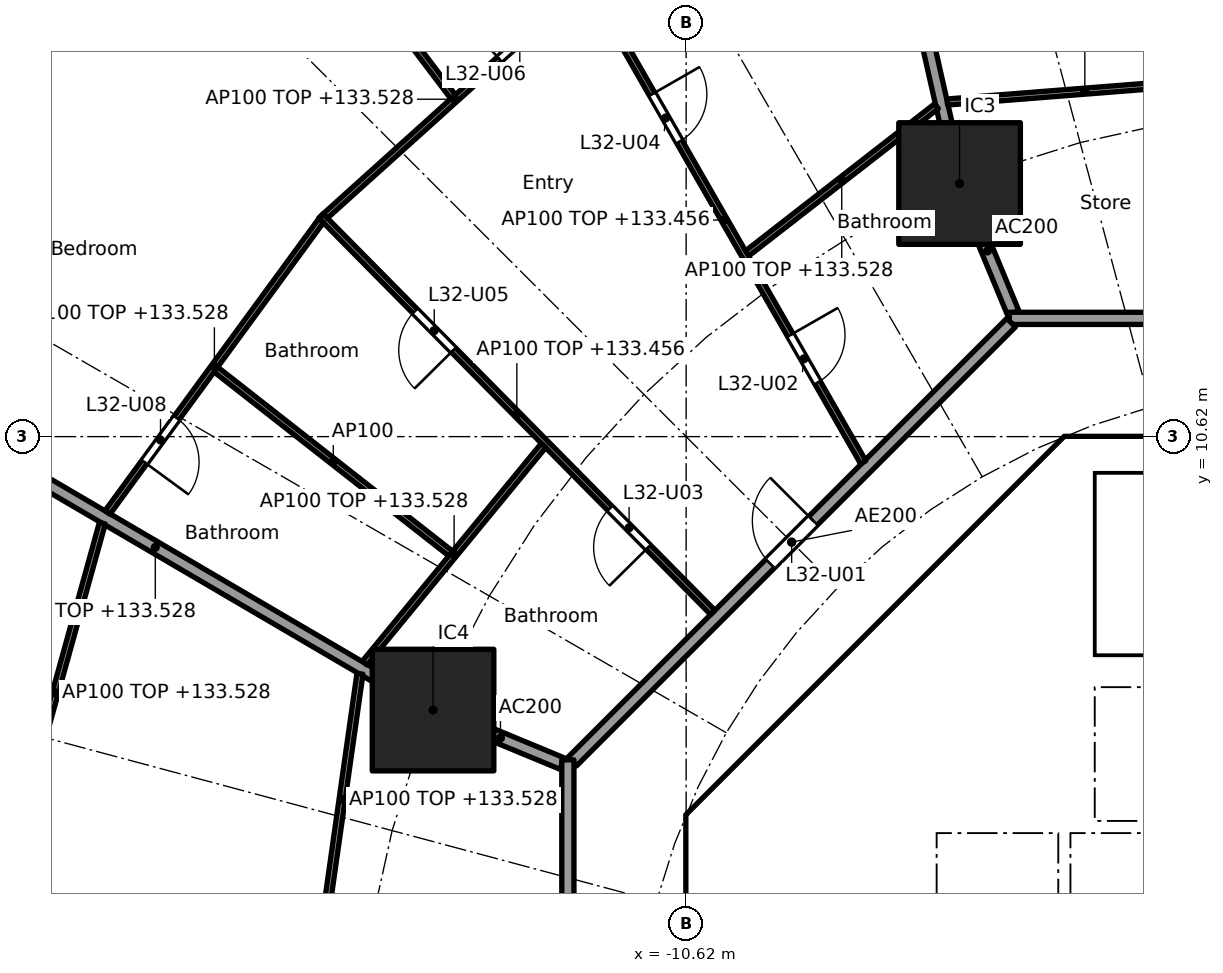
"""IFC4 building model, lengths in metres.
Left out: names, types, materials, properties, quantities, classifications, styles, units other than length and angle.
Written with IfcOpenShell. Run it as: python <this file> out.ifc"""

import sys

from ifc_helpers import new_model, si_unit, direction, frame, frame_2d, origin, origin_2d, place, context, subcontext, project, spatial, polyline, rectangle, outline, extrude, element, fill, save


model = new_model("IFC4")
c1 = context("Model", 3, precision=1e-05, world=origin(), true_north=direction((0.0, 1.0)))
c2 = subcontext(c1, "Body", "Model", "MODEL_VIEW")
j1 = project(units=[si_unit("LENGTHUNIT", "METRE"), si_unit("PLANEANGLEUNIT", "RADIAN")], contexts=[c1])
p1 = place(None, origin())
s1 = spatial("IfcSite", under=j1, at=p1, CompositionType="ELEMENT")
p2 = place(p1, origin())
s2 = spatial("IfcBuilding", under=s1, at=p2, CompositionType="ELEMENT")
p3 = place(p2, frame((0.0, 0.0, 130.7)))
s3 = spatial("IfcBuildingStorey", under=s2, at=p3, CompositionType="ELEMENT", Elevation=130.7)
for number, where, z_axis, x_axis in (
    (1, (-6.123, 14.782, 0.0), (0.0, 0.0, 1.0), (1.0, 0.0, 0.0)),
    (2, (-14.782, 6.123, 0.0), (0.0, 0.0, 1.0), (1.0, 0.0, 0.0)),
):
    element("IfcColumn", number, at=place(p3, frame(where, z_axis=z_axis, x_axis=x_axis)), inside=s3, PredefinedType="COLUMN", context=c2, shape_type="SweptSolid", body=[
        extrude(rectangle(XDim=2.0, YDim=2.0, at=origin_2d()), origin(), (0.0, 0.0, 1.0), 3.7),
    ])
p4 = place(p3, frame((-4.613, 9.988, 0.0), z_axis=(0.0, 0.0, 1.0), x_axis=(-0.707106781187, -0.707106781187, 0.0)))
e3 = element("IfcWall", 3, at=p4, inside=s3, PredefinedType="SHEAR", context=c2, shape_type="SweptSolid", body=[
    extrude(rectangle(XDim=7.602, YDim=0.6, at=frame_2d((3.801, 0.0))), origin(), (0.0, 0.0, 1.0), 3.44),
])
p5 = place(p4, frame((0.351, 0.0, 0.0)))
e4 = element("IfcOpeningElement", 4, at=p5, cuts=e3, PredefinedType="OPENING", context=c2, shape_type="SweptSolid", body=[
    extrude(rectangle(XDim=1.1, YDim=2.1, at=frame_2d((0.55, 1.05))), frame((0.0, 0.31, 0.0), z_axis=(0.0, -1.0, 0.0), x_axis=(1.0, 0.0, 0.0)), (0.0, 0.0, 1.0), 0.62),
])
p6 = place(p3, frame((-10.325, 3.801, 0.0), z_axis=(0.0, 0.0, 1.0), x_axis=(0.0, -1.0, 0.0)))
e5 = element("IfcWall", 5, at=p6, inside=s3, PredefinedType="SHEAR", context=c2, shape_type="SweptSolid", body=[
    extrude(rectangle(XDim=7.602, YDim=0.6, at=frame_2d((3.801, 0.0))), origin(), (0.0, 0.0, 1.0), 3.44),
])
p7 = place(p6, frame((0.651, 0.0, 0.0)))
e6 = element("IfcOpeningElement", 6, at=p7, cuts=e5, PredefinedType="OPENING", context=c2, shape_type="SweptSolid", body=[
    extrude(rectangle(XDim=1.5, YDim=2.1, at=frame_2d((0.75, 1.05))), frame((0.0, 0.31, 0.0), z_axis=(0.0, -1.0, 0.0), x_axis=(1.0, 0.0, 0.0)), (0.0, 0.0, 1.0), 0.62),
])
p8 = place(p6, frame((5.451, 0.0, 0.0)))
e7 = element("IfcOpeningElement", 7, at=p8, cuts=e5, PredefinedType="OPENING", context=c2, shape_type="SweptSolid", body=[
    extrude(rectangle(XDim=1.5, YDim=2.1, at=frame_2d((0.75, 1.05))), frame((0.0, 0.31, 0.0), z_axis=(0.0, -1.0, 0.0), x_axis=(1.0, 0.0, 0.0)), (0.0, 0.0, 1.0), 0.62),
])
p9 = place(p3, frame((-6.2, 4.3, 0.0), z_axis=(0.0, 0.0, 1.0), x_axis=(0.0, 1.0, 0.0)))
e8 = element("IfcWall", 8, at=p9, inside=s3, PredefinedType="PARTITIONING", context=c2, shape_type="SweptSolid", body=[
    extrude(rectangle(XDim=3.527, YDim=0.15, at=frame_2d((1.763, 0.0))), origin(), (0.0, 0.0, 1.0), 3.44),
])
p10 = place(p9, frame((0.262, 0.0, 0.0)))
e9 = element("IfcOpeningElement", 9, at=p10, cuts=e8, PredefinedType="OPENING", context=c2, shape_type="SweptSolid", body=[
    extrude(rectangle(XDim=0.9, YDim=2.1, at=frame_2d((0.45, 1.05))), frame((0.0, 0.085, 0.0), z_axis=(0.0, -1.0, 0.0), x_axis=(1.0, 0.0, 0.0)), (0.0, 0.0, 1.0), 0.17),
])
p11 = place(p9, frame((2.138, 0.0, 0.0)))
e10 = element("IfcOpeningElement", 10, at=p11, cuts=e8, PredefinedType="OPENING", context=c2, shape_type="SweptSolid", body=[
    extrude(rectangle(XDim=0.9, YDim=2.1, at=frame_2d((0.45, 1.05))), frame((0.0, 0.085, 0.0), z_axis=(0.0, -1.0, 0.0), x_axis=(1.0, 0.0, 0.0)), (0.0, 0.0, 1.0), 0.17),
])
p12 = place(p3, frame((-4.0, 4.3, 0.0), z_axis=(0.0, 0.0, 1.0), x_axis=(0.0, 1.0, 0.0)))
e11 = element("IfcWall", 11, at=p12, inside=s3, PredefinedType="SOLIDWALL", context=c2, shape_type="SweptSolid", body=[
    extrude(rectangle(XDim=2.2, YDim=0.2, at=frame_2d((1.1, 0.0))), origin(), (0.0, 0.0, 1.0), 3.44),
])
p13 = place(p12, frame((0.55, 0.0, 0.0)))
e12 = element("IfcOpeningElement", 12, at=p13, cuts=e11, PredefinedType="OPENING", context=c2, shape_type="SweptSolid", body=[
    extrude(rectangle(XDim=1.1, YDim=2.1, at=frame_2d((0.55, 1.05))), frame((0.0, 0.11, 0.0), z_axis=(0.0, -1.0, 0.0), x_axis=(1.0, 0.0, 0.0)), (0.0, 0.0, 1.0), 0.22),
])
p14 = place(p3, origin())
e13 = element("IfcWall", 13, at=p14, inside=s3, PredefinedType="SHEAR", context=c2, shape_type="SweptSolid", body=[
    extrude(outline(polyline([(-10.2, 4.825), (-9.776, 4.401), (-10.025, 4.152), (-10.025, 3.801), (-10.625, 3.801), (-10.625, 4.401), (-10.2, 4.825)])), origin(), (0.0, 0.0, 1.0), 3.44),
])
p15 = place(p3, origin())
e14 = element("IfcWall", 14, at=p15, inside=s3, PredefinedType="SHEAR", context=c2, shape_type="SweptSolid", body=[
    extrude(outline(polyline([(-4.152, 10.025), (-4.401, 9.776), (-4.825, 10.2), (-4.401, 10.625), (4.401, 10.625), (4.825, 10.2), (4.401, 9.776), (4.152, 10.025), (-4.152, 10.025)])), origin(), (0.0, 0.0, 1.0), 3.44),
])
p16 = place(p3, frame((-10.025, 4.0, 0.0), z_axis=(0.0, 0.0, 1.0), x_axis=(1.0, 0.0, 0.0)))
e15 = element("IfcWall", 15, at=p16, inside=s3, PredefinedType="PARTITIONING", context=c2, shape_type="SweptSolid", body=[
    extrude(rectangle(XDim=3.325, YDim=0.2, at=frame_2d((1.662, 0.0))), origin(), (0.0, 0.0, 1.0), 3.44),
])
p17 = place(p3, frame((-8.301, 5.8, 0.0), z_axis=(0.0, 0.0, 1.0), x_axis=(1.0, 0.0, 0.0)))
e16 = element("IfcWall", 16, at=p17, inside=s3, PredefinedType="PARTITIONING", context=c2, shape_type="SweptSolid", body=[
    extrude(rectangle(XDim=2.026, YDim=0.15, at=frame_2d((1.013, 0.0))), origin(), (0.0, 0.0, 1.0), 3.44),
])
p18 = place(p3, origin())
e17 = element("IfcWall", 17, at=p18, inside=s3, PredefinedType="SOLIDWALL", context=c2, shape_type="SweptSolid", body=[
    extrude(outline(polyline([(-6.5, 2.1), (-6.7, 2.1), (-6.7, 4.3), (6.7, 4.3), (6.7, 2.1), (6.5, 2.1), (6.5, 4.1), (4.5, 4.1), (4.5, 2.1), (4.3, 2.1), (4.3, 4.1), (2.3, 4.1), (2.3, 2.1), (2.1, 2.1), (2.1, 4.1), (0.1, 4.1), (0.1, 2.1), (-0.1, 2.1), (-0.1, 4.1), (-2.1, 4.1), (-2.1, 2.1), (-2.3, 2.1), (-2.3, 4.1), (-4.3, 4.1), (-4.3, 2.1), (-4.5, 2.1), (-4.5, 4.1), (-6.5, 4.1), (-6.5, 2.1)])), origin(), (0.0, 0.0, 1.0), 3.44),
])
p19 = place(p3, origin())
e18 = element("IfcWall", 18, at=p19, inside=s3, PredefinedType="SOLIDWALL", context=c2, shape_type="SweptSolid", body=[
    extrude(outline(polyline([(-3.9, 7.025), (-4.1, 7.025), (-4.1, 10.025), (-3.9, 10.025), (-3.9, 7.025)])), origin(), (0.0, 0.0, 1.0), 3.44),
])
p20 = place(p3, origin())
e19 = element("IfcWall", 19, at=p20, inside=s3, PredefinedType="SOLIDWALL", context=c2, shape_type="SweptSolid", body=[
    extrude(outline(polyline([(4.1, 6.5), (-4.1, 6.5), (-4.1, 7.025), (4.1, 7.025), (4.1, 6.5)])), origin(), (0.0, 0.0, 1.0), 3.44),
])
p21 = place(p3, frame((-5.243, 12.657, 0.0), z_axis=(0.0, 0.0, 1.0), x_axis=(-0.38273085373, 0.923859888513, 0.0)))
e20 = element("IfcWall", 20, at=p21, inside=s3, PredefinedType="PARTITIONING", context=c2, shape_type="SweptSolid", body=[
    extrude(rectangle(XDim=2.199, YDim=0.2, at=frame_2d((1.1, 0.0))), origin(), (0.0, 0.0, 1.0), 3.44),
])
p22 = place(p3, frame((-6.134, 14.831, 0.0), z_axis=(0.0, 0.0, 1.0), x_axis=(-0.220337590808, 0.975423675167, 0.0)))
e21 = element("IfcWall", 21, at=p22, inside=s3, PredefinedType="PARTITIONING", context=c2, shape_type="SweptSolid", body=[
    extrude(rectangle(XDim=10.451, YDim=0.2, at=frame_2d((5.226, 0.0))), origin(), (0.0, 0.0, 1.0), 2.828),
])
p23 = place(p3, frame((-12.657, 5.243, 0.0), z_axis=(0.0, 0.0, 1.0), x_axis=(-0.923869415315, 0.382707856524, 0.0)))
e22 = element("IfcWall", 22, at=p23, inside=s3, PredefinedType="PARTITIONING", context=c2, shape_type="SweptSolid", body=[
    extrude(rectangle(XDim=2.2, YDim=0.2, at=frame_2d((1.1, 0.0))), origin(), (0.0, 0.0, 1.0), 3.44),
])
p24 = place(p3, frame((-14.825, 6.148, 0.0), z_axis=(0.0, 0.0, 1.0), x_axis=(-0.862852031662, 0.505456597006, 0.0)))
e23 = element("IfcWall", 23, at=p24, inside=s3, PredefinedType="PARTITIONING", context=c2, shape_type="SweptSolid", body=[
    extrude(rectangle(XDim=10.487, YDim=0.2, at=frame_2d((5.244, 0.0))), origin(), (0.0, 0.0, 1.0), 2.828),
])
p25 = place(p3, frame((5.104, 12.565, 0.0), z_axis=(0.0, 0.0, 1.0), x_axis=(-1.0, 0.0, 0.0)))
e24 = element("IfcWall", 24, at=p25, inside=s3, PredefinedType="PARTITIONING", context=c2, shape_type="SweptSolid", body=[
    extrude(rectangle(XDim=10.409, YDim=0.2, at=frame_2d((5.205, 0.0))), origin(), (0.0, 0.0, 1.0), 3.44),
])
p26 = place(p25, frame((4.604, 0.0, 0.0)))
e25 = element("IfcOpeningElement", 25, at=p26, cuts=e24, PredefinedType="OPENING", context=c2, shape_type="SweptSolid", body=[
    extrude(rectangle(XDim=1.0, YDim=2.1, at=frame_2d((0.5, 1.05))), frame((0.0, 0.11, 0.0), z_axis=(0.0, -1.0, 0.0), x_axis=(1.0, 0.0, 0.0)), (0.0, 0.0, 1.0), 0.22),
])
p27 = place(p3, frame((-5.275, 12.494, 0.0), z_axis=(0.0, 0.0, 1.0), x_axis=(-0.707106781187, -0.707106781187, 0.0)))
e26 = element("IfcWall", 26, at=p27, inside=s3, PredefinedType="PARTITIONING", context=c2, shape_type="SweptSolid", body=[
    extrude(rectangle(XDim=10.209, YDim=0.2, at=frame_2d((5.104, 0.0))), origin(), (0.0, 0.0, 1.0), 3.44),
])
p28 = place(p27, frame((4.604, 0.0, 0.0)))
e27 = element("IfcOpeningElement", 27, at=p28, cuts=e26, PredefinedType="OPENING", context=c2, shape_type="SweptSolid", body=[
    extrude(rectangle(XDim=1.0, YDim=2.1, at=frame_2d((0.5, 1.05))), frame((0.0, 0.11, 0.0), z_axis=(0.0, -1.0, 0.0), x_axis=(1.0, 0.0, 0.0)), (0.0, 0.0, 1.0), 0.22),
])
p29 = place(p3, frame((-12.565, 5.304, 0.0), z_axis=(0.0, 0.0, 1.0), x_axis=(0.0, -1.0, 0.0)))
e28 = element("IfcWall", 28, at=p29, inside=s3, PredefinedType="PARTITIONING", context=c2, shape_type="SweptSolid", body=[
    extrude(rectangle(XDim=10.409, YDim=0.2, at=frame_2d((5.205, 0.0))), origin(), (0.0, 0.0, 1.0), 3.44),
])
p30 = place(p3, frame((-1.802, 16.479, 0.0), z_axis=(0.0, 0.0, 1.0), x_axis=(-0.996907698294, -0.078581429625, 0.0)))
e29 = element("IfcWall", 29, at=p30, inside=s3, PredefinedType="PARTITIONING", context=c2, shape_type="SweptSolid", body=[
    extrude(rectangle(XDim=4.536, YDim=0.1, at=frame_2d((2.268, 0.0))), origin(), (0.0, 0.0, 1.0), 2.828),
])
p31 = place(p3, frame((-6.503, 16.054, 0.0), z_axis=(0.0, 0.0, 1.0), x_axis=(-0.789428807693, -0.613842127574, 0.0)))
e30 = element("IfcWall", 30, at=p31, inside=s3, PredefinedType="PARTITIONING", context=c2, shape_type="SweptSolid", body=[
    extrude(rectangle(XDim=3.948, YDim=0.1, at=frame_2d((1.974, 0.0))), origin(), (0.0, 0.0, 1.0), 2.828),
])
p32 = place(p3, frame((-7.708, 10.198, 0.0), z_axis=(0.0, 0.0, 1.0), x_axis=(-0.497449462689, 0.867492957937, 0.0)))
e31 = element("IfcWall", 31, at=p32, inside=s3, PredefinedType="PARTITIONING", context=c2, shape_type="SweptSolid", body=[
    extrude(rectangle(XDim=9.185, YDim=0.1, at=frame_2d((4.592, 0.0))), origin(), (0.0, 0.0, 1.0), 2.756),
])
p33 = place(p32, frame((1.511, 0.0, 0.0)))
e32 = element("IfcOpeningElement", 32, at=p33, cuts=e31, PredefinedType="OPENING", context=c2, shape_type="SweptSolid", body=[
    extrude(rectangle(XDim=0.9, YDim=2.1, at=frame_2d((0.45, 1.05))), frame((0.0, 0.06, 0.0), z_axis=(0.0, -1.0, 0.0), x_axis=(1.0, 0.0, 0.0)), (0.0, 0.0, 1.0), 0.12),
])
p34 = place(p32, frame((6.078, 0.0, 0.0)))
e33 = element("IfcOpeningElement", 33, at=p34, cuts=e31, PredefinedType="OPENING", context=c2, shape_type="SweptSolid", body=[
    extrude(rectangle(XDim=0.9, YDim=2.1, at=frame_2d((0.45, 1.05))), frame((0.0, 0.06, 0.0), z_axis=(0.0, -1.0, 0.0), x_axis=(1.0, 0.0, 0.0)), (0.0, 0.0, 1.0), 0.12),
])
p35 = place(p3, frame((-12.289, 18.089, 0.0), z_axis=(0.0, 0.0, 1.0), x_axis=(-0.743146066164, -0.669129228435, 0.0)))
e34 = element("IfcWall", 34, at=p35, inside=s3, PredefinedType="PARTITIONING", context=c2, shape_type="SweptSolid", body=[
    extrude(rectangle(XDim=5.739, YDim=0.1, at=frame_2d((2.87, 0.0))), origin(), (0.0, 0.0, 1.0), 2.828),
])
p36 = place(p35, frame((0.985, 0.0, 0.0)))
e35 = element("IfcOpeningElement", 35, at=p36, cuts=e34, PredefinedType="OPENING", context=c2, shape_type="SweptSolid", body=[
    extrude(rectangle(XDim=0.9, YDim=2.1, at=frame_2d((0.45, 1.05))), frame((0.0, 0.06, 0.0), z_axis=(0.0, -1.0, 0.0), x_axis=(1.0, 0.0, 0.0)), (0.0, 0.0, 1.0), 0.12),
])
p37 = place(p3, frame((-14.452, 16.208, 0.0), z_axis=(0.0, 0.0, 1.0), x_axis=(-0.603267974074, 0.797538557975, 0.0)))
e36 = element("IfcWall", 36, at=p37, inside=s3, PredefinedType="PARTITIONING", context=c2, shape_type="SweptSolid", body=[
    extrude(rectangle(XDim=5.764, YDim=0.1, at=frame_2d((2.882, 0.0))), origin(), (0.0, 0.0, 1.0), 2.905),
])
p38 = place(p37, frame((2.432, 0.0, 0.0)))
e37 = element("IfcOpeningElement", 37, at=p38, cuts=e36, PredefinedType="OPENING", context=c2, shape_type="SweptSolid", body=[
    extrude(rectangle(XDim=0.9, YDim=2.1, at=frame_2d((0.45, 1.05))), frame((0.0, 0.06, 0.0), z_axis=(0.0, -1.0, 0.0), x_axis=(1.0, 0.0, 0.0)), (0.0, 0.0, 1.0), 0.12),
])
p39 = place(p3, frame((-10.182, 7.729, 0.0), z_axis=(0.0, 0.0, 1.0), x_axis=(-0.702927211734, 0.711261790766, 0.0)))
e38 = element("IfcWall", 38, at=p39, inside=s3, PredefinedType="PARTITIONING", context=c2, shape_type="SweptSolid", body=[
    extrude(rectangle(XDim=9.168, YDim=0.1, at=frame_2d((4.584, 0.0))), origin(), (0.0, 0.0, 1.0), 2.756),
])
p40 = place(p39, frame((1.507, 0.0, 0.0)))
e39 = element("IfcOpeningElement", 39, at=p40, cuts=e38, PredefinedType="OPENING", context=c2, shape_type="SweptSolid", body=[
    extrude(rectangle(XDim=0.9, YDim=2.1, at=frame_2d((0.45, 1.05))), frame((0.0, 0.06, 0.0), z_axis=(0.0, -1.0, 0.0), x_axis=(1.0, 0.0, 0.0)), (0.0, 0.0, 1.0), 0.12),
])
p41 = place(p39, frame((6.067, 0.0, 0.0)))
e40 = element("IfcOpeningElement", 40, at=p41, cuts=e38, PredefinedType="OPENING", context=c2, shape_type="SweptSolid", body=[
    extrude(rectangle(XDim=0.9, YDim=2.1, at=frame_2d((0.45, 1.05))), frame((0.0, 0.06, 0.0), z_axis=(0.0, -1.0, 0.0), x_axis=(1.0, 0.0, 0.0)), (0.0, 0.0, 1.0), 0.12),
])
p42 = place(p3, frame((-12.965, 10.475, 0.0), z_axis=(0.0, 0.0, 1.0), x_axis=(-0.634943961338, -0.772558195841, 0.0)))
e41 = element("IfcWall", 41, at=p42, inside=s3, PredefinedType="PARTITIONING", context=c2, shape_type="SweptSolid", body=[
    extrude(rectangle(XDim=4.632, YDim=0.1, at=frame_2d((2.316, 0.0))), origin(), (0.0, 0.0, 1.0), 2.828),
])
p43 = place(p3, frame((-16.621, 14.174, 0.0), z_axis=(0.0, 0.0, 1.0), x_axis=(-0.590674917338, -0.806909624449, 0.0)))
e42 = element("IfcWall", 42, at=p43, inside=s3, PredefinedType="PARTITIONING", context=c2, shape_type="SweptSolid", body=[
    extrude(rectangle(XDim=5.949, YDim=0.1, at=frame_2d((2.975, 0.0))), origin(), (0.0, 0.0, 1.0), 2.828),
])
p44 = place(p43, frame((4.024, 0.0, 0.0)))
e43 = element("IfcOpeningElement", 43, at=p44, cuts=e42, PredefinedType="OPENING", context=c2, shape_type="SweptSolid", body=[
    extrude(rectangle(XDim=0.9, YDim=2.1, at=frame_2d((0.45, 1.05))), frame((0.0, 0.06, 0.0), z_axis=(0.0, -1.0, 0.0), x_axis=(1.0, 0.0, 0.0)), (0.0, 0.0, 1.0), 0.12),
])
p45 = place(p3, frame((-14.491, 8.697, 0.0), z_axis=(0.0, 0.0, 1.0), x_axis=(-0.787139479951, 0.616775031193, 0.0)))
e44 = element("IfcWall", 44, at=p45, inside=s3, PredefinedType="PARTITIONING", context=c2, shape_type="SweptSolid", body=[
    extrude(rectangle(XDim=4.907, YDim=0.1, at=frame_2d((2.453, 0.0))), origin(), (0.0, 0.0, 1.0), 3.44),
])
p46 = place(p3, frame((-15.984, 6.72, 0.0), z_axis=(0.0, 0.0, 1.0), x_axis=(-0.140684869512, -0.990054426529, 0.0)))
e45 = element("IfcWall", 45, at=p46, inside=s3, PredefinedType="PARTITIONING", context=c2, shape_type="SweptSolid", body=[
    extrude(rectangle(XDim=4.177, YDim=0.1, at=frame_2d((2.088, 0.0))), origin(), (0.0, 0.0, 1.0), 2.828),
])
p47 = place(p3, frame((-20.221, 9.197, 0.0), z_axis=(0.0, 0.0, 1.0), x_axis=(-0.267398009191, -0.963586168789, 0.0)))
e46 = element("IfcWall", 46, at=p47, inside=s3, PredefinedType="PARTITIONING", context=c2, shape_type="SweptSolid", body=[
    extrude(rectangle(XDim=5.788, YDim=0.1, at=frame_2d((2.894, 0.0))), origin(), (0.0, 0.0, 1.0), 2.828),
])
p48 = place(p13, origin())
e47 = element("IfcDoor", 47, at=p48, inside=s3, OperationType="DOUBLE_DOOR_SLIDING", PredefinedType="DOOR", context=c2, shape_type="SweptSolid", body=[
    extrude(rectangle(XDim=1.1, YDim=2.1, at=frame_2d((0.55, 1.05))), frame((0.0, 0.025, 0.0), z_axis=(0.0, -1.0, 0.0), x_axis=(1.0, 0.0, 0.0)), (0.0, 0.0, 1.0), 0.05),
])
fill(e12, e47)
p49 = place(p10, origin())
e48 = element("IfcDoor", 48, at=p49, inside=s3, OperationType="SINGLE_SWING_RIGHT", PredefinedType="DOOR", context=c2, shape_type="SweptSolid", body=[
    extrude(rectangle(XDim=0.9, YDim=2.1, at=frame_2d((0.45, 1.05))), frame((0.0, 0.025, 0.0), z_axis=(0.0, -1.0, 0.0), x_axis=(1.0, 0.0, 0.0)), (0.0, 0.0, 1.0), 0.05),
])
fill(e9, e48)
p50 = place(p11, origin())
e49 = element("IfcDoor", 49, at=p50, inside=s3, OperationType="SINGLE_SWING_RIGHT", PredefinedType="DOOR", context=c2, shape_type="SweptSolid", body=[
    extrude(rectangle(XDim=0.9, YDim=2.1, at=frame_2d((0.45, 1.05))), frame((0.0, 0.025, 0.0), z_axis=(0.0, -1.0, 0.0), x_axis=(1.0, 0.0, 0.0)), (0.0, 0.0, 1.0), 0.05),
])
fill(e10, e49)
p51 = place(p7, origin())
e50 = element("IfcDoor", 50, at=p51, inside=s3, OperationType="DOUBLE_DOOR_SINGLE_SWING", PredefinedType="DOOR", context=c2, shape_type="SweptSolid", body=[
    extrude(rectangle(XDim=1.5, YDim=2.1, at=frame_2d((0.75, 1.05))), frame((0.0, 0.025, 0.0), z_axis=(0.0, -1.0, 0.0), x_axis=(1.0, 0.0, 0.0)), (0.0, 0.0, 1.0), 0.05),
])
fill(e6, e50)
p52 = place(p5, origin())
e51 = element("IfcDoor", 51, at=p52, inside=s3, OperationType="SINGLE_SWING_LEFT", PredefinedType="DOOR", context=c2, shape_type="SweptSolid", body=[
    extrude(rectangle(XDim=1.1, YDim=2.1, at=frame_2d((0.55, 1.05))), frame((0.0, 0.025, 0.0), z_axis=(0.0, -1.0, 0.0), x_axis=(1.0, 0.0, 0.0)), (0.0, 0.0, 1.0), 0.05),
])
fill(e4, e51)
p53 = place(p28, frame((1.0, 0.0, 0.0), x_axis=(-1.0, 0.0, 0.0)))
e52 = element("IfcDoor", 52, at=p53, inside=s3, OperationType="SINGLE_SWING_RIGHT", PredefinedType="DOOR", context=c2, shape_type="SweptSolid", body=[
    extrude(rectangle(XDim=1.0, YDim=2.1, at=frame_2d((0.5, 1.05))), frame((0.0, 0.025, 0.0), z_axis=(0.0, -1.0, 0.0), x_axis=(1.0, 0.0, 0.0)), (0.0, 0.0, 1.0), 0.05),
])
fill(e27, e52)
p54 = place(p33, frame((0.9, 0.0, 0.0), x_axis=(-1.0, 0.0, 0.0)))
e53 = element("IfcDoor", 53, at=p54, inside=s3, OperationType="SINGLE_SWING_LEFT", PredefinedType="DOOR", context=c2, shape_type="SweptSolid", body=[
    extrude(rectangle(XDim=0.9, YDim=2.1, at=frame_2d((0.45, 1.05))), frame((0.0, 0.025, 0.0), z_axis=(0.0, -1.0, 0.0), x_axis=(1.0, 0.0, 0.0)), (0.0, 0.0, 1.0), 0.05),
])
fill(e32, e53)
p55 = place(p40, origin())
e54 = element("IfcDoor", 54, at=p55, inside=s3, OperationType="SINGLE_SWING_LEFT", PredefinedType="DOOR", context=c2, shape_type="SweptSolid", body=[
    extrude(rectangle(XDim=0.9, YDim=2.1, at=frame_2d((0.45, 1.05))), frame((0.0, 0.025, 0.0), z_axis=(0.0, -1.0, 0.0), x_axis=(1.0, 0.0, 0.0)), (0.0, 0.0, 1.0), 0.05),
])
fill(e39, e54)
p56 = place(p34, frame((0.9, 0.0, 0.0), x_axis=(-1.0, 0.0, 0.0)))
e55 = element("IfcDoor", 55, at=p56, inside=s3, OperationType="SINGLE_SWING_LEFT", PredefinedType="DOOR", context=c2, shape_type="SweptSolid", body=[
    extrude(rectangle(XDim=0.9, YDim=2.1, at=frame_2d((0.45, 1.05))), frame((0.0, 0.025, 0.0), z_axis=(0.0, -1.0, 0.0), x_axis=(1.0, 0.0, 0.0)), (0.0, 0.0, 1.0), 0.05),
])
fill(e33, e55)
p57 = place(p41, origin())
e56 = element("IfcDoor", 56, at=p57, inside=s3, OperationType="SINGLE_SWING_LEFT", PredefinedType="DOOR", context=c2, shape_type="SweptSolid", body=[
    extrude(rectangle(XDim=0.9, YDim=2.1, at=frame_2d((0.45, 1.05))), frame((0.0, 0.025, 0.0), z_axis=(0.0, -1.0, 0.0), x_axis=(1.0, 0.0, 0.0)), (0.0, 0.0, 1.0), 0.05),
])
fill(e40, e56)
p58 = place(p36, frame((0.9, 0.0, 0.0), x_axis=(-1.0, 0.0, 0.0)))
e57 = element("IfcDoor", 57, at=p58, inside=s3, OperationType="SINGLE_SWING_LEFT", PredefinedType="DOOR", context=c2, shape_type="SweptSolid", body=[
    extrude(rectangle(XDim=0.9, YDim=2.1, at=frame_2d((0.45, 1.05))), frame((0.0, 0.025, 0.0), z_axis=(0.0, -1.0, 0.0), x_axis=(1.0, 0.0, 0.0)), (0.0, 0.0, 1.0), 0.05),
])
fill(e35, e57)
p59 = place(p44, origin())
e58 = element("IfcDoor", 58, at=p59, inside=s3, OperationType="SINGLE_SWING_RIGHT", PredefinedType="DOOR", context=c2, shape_type="SweptSolid", body=[
    extrude(rectangle(XDim=0.9, YDim=2.1, at=frame_2d((0.45, 1.05))), frame((0.0, 0.025, 0.0), z_axis=(0.0, -1.0, 0.0), x_axis=(1.0, 0.0, 0.0)), (0.0, 0.0, 1.0), 0.05),
])
fill(e43, e58)
save(model, sys.argv[1])
